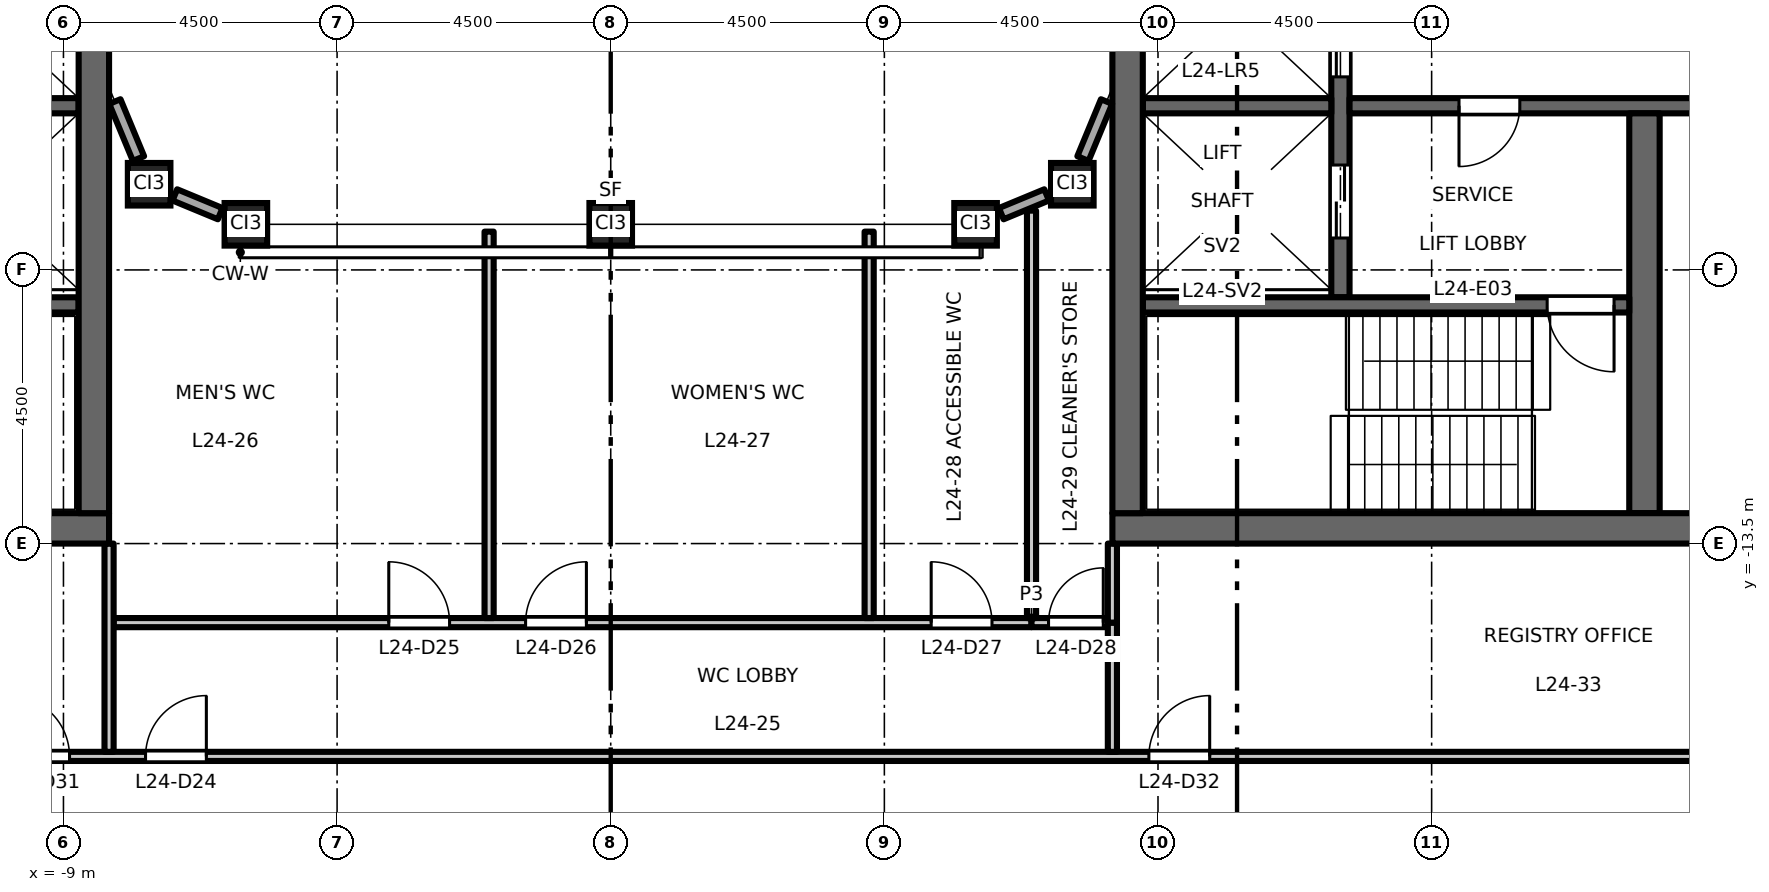
"""IFC4 building model, lengths in metres.
Left out: names, types, materials, properties, quantities, classifications, styles, units other than length and angle.
Written with IfcOpenShell. Run it as: python <this file> out.ifc"""

import sys

from ifc_helpers import new_model, si_unit, direction, frame, frame_2d, origin, origin_2d, place, context, subcontext, project, spatial, rectangle, hollow_rectangle, extrude, element, fill, save


model = new_model("IFC4")
c1 = context("Model", 3, precision=1e-05, world=origin(), true_north=direction((0.0, 1.0)))
c2 = subcontext(c1, "Body", "Model", "MODEL_VIEW")
j1 = project(units=[si_unit("LENGTHUNIT", "METRE"), si_unit("PLANEANGLEUNIT", "RADIAN")], contexts=[c1])
p1 = place(None, origin())
s1 = spatial("IfcSite", under=j1, at=p1, CompositionType="ELEMENT")
p2 = place(p1, origin())
s2 = spatial("IfcBuilding", under=s1, at=p2, CompositionType="ELEMENT")
p3 = place(p2, frame((0.0, 0.0, 113.7)))
s3 = spatial("IfcBuildingStorey", under=s2, at=p3, CompositionType="ELEMENT", Elevation=113.7)
for number, where, z_axis, x_axis in (
    (1, (-7.591, -7.591, 0.0), (0.0, 0.0, 1.0), (1.0, 0.0, 0.0)),
    (2, (-6.0, -8.25, 0.0), (0.0, 0.0, 1.0), (1.0, 0.0, 0.0)),
    (3, (0.0, -8.25, 0.0), (0.0, 0.0, 1.0), (1.0, 0.0, 0.0)),
    (4, (6.0, -8.25, 0.0), (0.0, 0.0, 1.0), (1.0, 0.0, 0.0)),
    (5, (7.591, -7.591, 0.0), (0.0, 0.0, 1.0), (1.0, 0.0, 0.0)),
):
    element("IfcColumn", number, at=place(p3, frame(where, z_axis=z_axis, x_axis=x_axis)), inside=s3, PredefinedType="COLUMN", context=c2, shape_type="SweptSolid", body=[
        extrude(hollow_rectangle(XDim=0.7, YDim=0.7, WallThickness=0.04, at=origin_2d()), origin(), (0.0, 0.0, 1.0), 4.5),
    ])
p4 = place(p3, frame((-8.75, -6.3, 0.0), z_axis=(0.0, 0.0, 1.0), x_axis=(-1.0, 0.0, 0.0)))
e6 = element("IfcWall", 6, at=p4, inside=s3, PredefinedType="SHEAR", context=c2, shape_type="SweptSolid", body=[
    extrude(rectangle(XDim=3.1, YDim=0.25, at=frame_2d((1.55, 0.0))), origin(), (0.0, 0.0, 1.0), 4.35),
])
p5 = place(p3, frame((-8.75, -9.575, 0.0), z_axis=(0.0, 0.0, 1.0), x_axis=(-1.0, 0.0, 0.0)))
e7 = element("IfcWall", 7, at=p5, inside=s3, PredefinedType="SHEAR", context=c2, shape_type="SweptSolid", body=[
    extrude(rectangle(XDim=8.0, YDim=0.25, at=frame_2d((4.0, 0.0))), origin(), (0.0, 0.0, 1.0), 4.35),
])
p6 = place(p5, frame((6.65, 0.0, 0.0)))
e8 = element("IfcOpeningElement", 8, at=p6, cuts=e7, PredefinedType="OPENING", context=c2, shape_type="SweptSolid", body=[
    extrude(rectangle(XDim=1.1, YDim=2.1, at=frame_2d((0.55, 1.05))), frame((0.0, 0.135, 0.0), z_axis=(0.0, -1.0, 0.0), x_axis=(1.0, 0.0, 0.0)), (0.0, 0.0, 1.0), 0.27),
])
p7 = place(p3, frame((-8.25, -13.25, 0.0), z_axis=(0.0, 0.0, 1.0), x_axis=(-1.0, 0.0, 0.0)))
e9 = element("IfcWall", 9, at=p7, inside=s3, PredefinedType="SHEAR", context=c2, shape_type="SweptSolid", body=[
    extrude(rectangle(XDim=13.5, YDim=0.5, at=frame_2d((6.75, 0.0))), origin(), (0.0, 0.0, 1.0), 4.35),
])
p8 = place(p3, frame((-8.5, -13.0, 0.0), z_axis=(0.0, 0.0, 1.0), x_axis=(0.0, 1.0, 0.0)))
e10 = element("IfcWall", 10, at=p8, inside=s3, PredefinedType="SHEAR", context=c2, shape_type="SweptSolid", body=[
    extrude(rectangle(XDim=26.0, YDim=0.5, at=frame_2d((13.0, 0.0))), origin(), (0.0, 0.0, 1.0), 4.35),
])
p9 = place(p3, frame((12.0, -9.45, 0.0), z_axis=(0.0, 0.0, 1.0), x_axis=(0.0, 1.0, 0.0)))
e11 = element("IfcWall", 11, at=p9, inside=s3, PredefinedType="SHEAR", context=c2, shape_type="SweptSolid", body=[
    extrude(rectangle(XDim=18.9, YDim=0.3, at=frame_2d((9.45, 0.0))), origin(), (0.0, 0.0, 1.0), 4.35),
])
p10 = place(p9, frame((3.625, 0.0, 0.0)))
e12 = element("IfcOpeningElement", 12, at=p10, cuts=e11, PredefinedType="OPENING", context=c2, shape_type="SweptSolid", body=[
    extrude(rectangle(XDim=1.1, YDim=2.1, at=frame_2d((0.55, 1.05))), frame((0.0, 0.16, 0.0), z_axis=(0.0, -1.0, 0.0), x_axis=(1.0, 0.0, 0.0)), (0.0, 0.0, 1.0), 0.32),
])
p11 = place(p9, frame((6.775, 0.0, 0.0)))
e13 = element("IfcOpeningElement", 13, at=p11, cuts=e11, PredefinedType="OPENING", context=c2, shape_type="SweptSolid", body=[
    extrude(rectangle(XDim=1.1, YDim=2.1, at=frame_2d((0.55, 1.05))), frame((0.0, 0.16, 0.0), z_axis=(0.0, -1.0, 0.0), x_axis=(1.0, 0.0, 0.0)), (0.0, 0.0, 1.0), 0.32),
])
p12 = place(p9, frame((9.925, 0.0, 0.0)))
e14 = element("IfcOpeningElement", 14, at=p12, cuts=e11, PredefinedType="OPENING", context=c2, shape_type="SweptSolid", body=[
    extrude(rectangle(XDim=1.1, YDim=2.1, at=frame_2d((0.55, 1.05))), frame((0.0, 0.16, 0.0), z_axis=(0.0, -1.0, 0.0), x_axis=(1.0, 0.0, 0.0)), (0.0, 0.0, 1.0), 0.32),
])
p13 = place(p9, frame((13.075, 0.0, 0.0)))
e15 = element("IfcOpeningElement", 15, at=p13, cuts=e11, PredefinedType="OPENING", context=c2, shape_type="SweptSolid", body=[
    extrude(rectangle(XDim=1.1, YDim=2.1, at=frame_2d((0.55, 1.05))), frame((0.0, 0.16, 0.0), z_axis=(0.0, -1.0, 0.0), x_axis=(1.0, 0.0, 0.0)), (0.0, 0.0, 1.0), 0.32),
])
p14 = place(p9, frame((16.725, 0.0, 0.0)))
e16 = element("IfcOpeningElement", 16, at=p14, cuts=e11, PredefinedType="OPENING", context=c2, shape_type="SweptSolid", body=[
    extrude(rectangle(XDim=1.2, YDim=2.1, at=frame_2d((0.6, 1.05))), frame((0.0, 0.16, 0.0), z_axis=(0.0, -1.0, 0.0), x_axis=(1.0, 0.0, 0.0)), (0.0, 0.0, 1.0), 0.32),
])
p15 = place(p9, frame((0.975, 0.0, 0.0)))
e17 = element("IfcOpeningElement", 17, at=p15, cuts=e11, PredefinedType="OPENING", context=c2, shape_type="SweptSolid", body=[
    extrude(rectangle(XDim=1.2, YDim=2.1, at=frame_2d((0.6, 1.05))), frame((0.0, 0.16, 0.0), z_axis=(0.0, -1.0, 0.0), x_axis=(1.0, 0.0, 0.0)), (0.0, 0.0, 1.0), 0.32),
])
p16 = place(p3, frame((12.15, -6.3, 0.0), z_axis=(0.0, 0.0, 1.0), x_axis=(1.0, 0.0, 0.0)))
e18 = element("IfcWall", 18, at=p16, inside=s3, PredefinedType="SHEAR", context=c2, shape_type="SweptSolid", body=[
    extrude(rectangle(XDim=9.1, YDim=0.25, at=frame_2d((4.55, 0.0))), origin(), (0.0, 0.0, 1.0), 4.35),
])
p17 = place(p16, frame((1.8, 0.0, 0.0)))
e19 = element("IfcOpeningElement", 19, at=p17, cuts=e18, PredefinedType="OPENING", context=c2, shape_type="SweptSolid", body=[
    extrude(rectangle(XDim=1.0, YDim=2.1, at=frame_2d((0.5, 1.05))), frame((0.0, 0.135, 0.0), z_axis=(0.0, -1.0, 0.0), x_axis=(1.0, 0.0, 0.0)), (0.0, 0.0, 1.0), 0.27),
])
p18 = place(p16, frame((6.65, 0.0, 0.0)))
e20 = element("IfcOpeningElement", 20, at=p18, cuts=e18, PredefinedType="OPENING", context=c2, shape_type="SweptSolid", body=[
    extrude(rectangle(XDim=0.9, YDim=2.1, at=frame_2d((0.45, 1.05))), frame((0.0, 0.135, 0.0), z_axis=(0.0, -1.0, 0.0), x_axis=(1.0, 0.0, 0.0)), (0.0, 0.0, 1.0), 0.27),
])
p19 = place(p3, frame((17.0, -13.0, 0.0), z_axis=(0.0, 0.0, 1.0), x_axis=(0.0, 1.0, 0.0)))
e21 = element("IfcWall", 21, at=p19, inside=s3, PredefinedType="SHEAR", context=c2, shape_type="SweptSolid", body=[
    extrude(rectangle(XDim=6.575, YDim=0.5, at=frame_2d((3.288, 0.0))), origin(), (0.0, 0.0, 1.0), 4.35),
])
p20 = place(p3, frame((8.75, -6.3, 0.0), z_axis=(0.0, 0.0, 1.0), x_axis=(1.0, 0.0, 0.0)))
e22 = element("IfcWall", 22, at=p20, inside=s3, PredefinedType="SHEAR", context=c2, shape_type="SweptSolid", body=[
    extrude(rectangle(XDim=3.1, YDim=0.25, at=frame_2d((1.55, 0.0))), origin(), (0.0, 0.0, 1.0), 4.35),
])
p21 = place(p3, frame((8.75, -9.575, 0.0), z_axis=(0.0, 0.0, 1.0), x_axis=(1.0, 0.0, 0.0)))
e23 = element("IfcWall", 23, at=p21, inside=s3, PredefinedType="SHEAR", context=c2, shape_type="SweptSolid", body=[
    extrude(rectangle(XDim=8.0, YDim=0.25, at=frame_2d((4.0, 0.0))), origin(), (0.0, 0.0, 1.0), 4.35),
])
p22 = place(p21, frame((6.65, 0.0, 0.0)))
e24 = element("IfcOpeningElement", 24, at=p22, cuts=e23, PredefinedType="OPENING", context=c2, shape_type="SweptSolid", body=[
    extrude(rectangle(XDim=1.1, YDim=2.1, at=frame_2d((0.55, 1.05))), frame((0.0, 0.135, 0.0), z_axis=(0.0, -1.0, 0.0), x_axis=(1.0, 0.0, 0.0)), (0.0, 0.0, 1.0), 0.27),
])
p23 = place(p3, frame((8.25, -13.25, 0.0), z_axis=(0.0, 0.0, 1.0), x_axis=(1.0, 0.0, 0.0)))
e25 = element("IfcWall", 25, at=p23, inside=s3, PredefinedType="SHEAR", context=c2, shape_type="SweptSolid", body=[
    extrude(rectangle(XDim=13.5, YDim=0.5, at=frame_2d((6.75, 0.0))), origin(), (0.0, 0.0, 1.0), 4.35),
])
p24 = place(p3, frame((8.5, -13.0, 0.0), z_axis=(0.0, 0.0, 1.0), x_axis=(0.0, 1.0, 0.0)))
e26 = element("IfcWall", 26, at=p24, inside=s3, PredefinedType="SHEAR", context=c2, shape_type="SweptSolid", body=[
    extrude(rectangle(XDim=26.0, YDim=0.5, at=frame_2d((13.0, 0.0))), origin(), (0.0, 0.0, 1.0), 4.35),
])
p25 = place(p3, frame((6.423, -8.075, 0.0), z_axis=(0.0, 0.0, 1.0), x_axis=(0.923817771127, 0.382832503518, 0.0)))
e27 = element("IfcWall", 27, at=p25, inside=s3, PredefinedType="STANDARD", context=c2, shape_type="SweptSolid", body=[
    extrude(rectangle(XDim=0.807, YDim=0.2, at=frame_2d((0.404, 0.0))), origin(), (0.0, 0.0, 1.0), 3.826),
])
for number, where, z_axis, x_axis in (
    (28, (7.766, -7.168, 0.0), (0.0, 0.0, 1.0), (0.383, 0.924, 0.0)),
    (29, (-8.154, -6.231, 0.0), (0.0, 0.0, 1.0), (0.383, -0.924, 0.0)),
):
    element("IfcWall", number, at=place(p3, frame(where, z_axis=z_axis, x_axis=x_axis)), inside=s3, PredefinedType="STANDARD", context=c2, shape_type="SweptSolid", body=[
        extrude(rectangle(XDim=1.015, YDim=0.2, at=frame_2d((0.507, 0.0))), origin(), (0.0, 0.0, 1.0), 3.826),
    ])
p26 = place(p3, frame((-7.168, -7.766, 0.0), z_axis=(0.0, 0.0, 1.0), x_axis=(0.923817771127, -0.382832503518, 0.0)))
e30 = element("IfcWall", 30, at=p26, inside=s3, PredefinedType="STANDARD", context=c2, shape_type="SweptSolid", body=[
    extrude(rectangle(XDim=0.807, YDim=0.2, at=frame_2d((0.404, 0.0))), origin(), (0.0, 0.0, 1.0), 3.826),
])
p27 = place(p3, frame((-21.825, -17.0, 0.0), z_axis=(0.0, 0.0, 1.0), x_axis=(1.0, 0.0, 0.0)))
e31 = element("IfcWall", 31, at=p27, inside=s3, PredefinedType="PARTITIONING", context=c2, shape_type="SweptSolid", body=[
    extrude(rectangle(XDim=43.65, YDim=0.15, at=frame_2d((21.825, 0.0))), origin(), (0.0, 0.0, 1.0), 4.35),
])
p28 = place(p27, frame((14.175, 0.0, 0.0)))
e32 = element("IfcOpeningElement", 32, at=p28, cuts=e31, PredefinedType="OPENING", context=c2, shape_type="SweptSolid", body=[
    extrude(rectangle(XDim=1.0, YDim=2.1, at=frame_2d((0.5, 1.05))), frame((0.0, 0.085, 0.0), z_axis=(0.0, -1.0, 0.0), x_axis=(1.0, 0.0, 0.0)), (0.0, 0.0, 1.0), 0.17),
])
p29 = place(p27, frame((11.925, 0.0, 0.0)))
e33 = element("IfcOpeningElement", 33, at=p29, cuts=e31, PredefinedType="OPENING", context=c2, shape_type="SweptSolid", body=[
    extrude(rectangle(XDim=1.0, YDim=2.1, at=frame_2d((0.5, 1.05))), frame((0.0, 0.085, 0.0), z_axis=(0.0, -1.0, 0.0), x_axis=(1.0, 0.0, 0.0)), (0.0, 0.0, 1.0), 0.17),
])
p30 = place(p27, frame((30.675, 0.0, 0.0)))
e34 = element("IfcOpeningElement", 34, at=p30, cuts=e31, PredefinedType="OPENING", context=c2, shape_type="SweptSolid", body=[
    extrude(rectangle(XDim=1.0, YDim=2.1, at=frame_2d((0.5, 1.05))), frame((0.0, 0.085, 0.0), z_axis=(0.0, -1.0, 0.0), x_axis=(1.0, 0.0, 0.0)), (0.0, 0.0, 1.0), 0.17),
])
p31 = place(p3, frame((-8.175, -14.8, 0.0), z_axis=(0.0, 0.0, 1.0), x_axis=(1.0, 0.0, 0.0)))
e35 = element("IfcWall", 35, at=p31, inside=s3, PredefinedType="PARTITIONING", context=c2, shape_type="SweptSolid", body=[
    extrude(rectangle(XDim=15.095, YDim=0.15, at=frame_2d((7.547, 0.0))), origin(), (0.0, 0.0, 1.0), 4.35),
])
p32 = place(p31, frame((4.525, 0.0, 0.0)))
e36 = element("IfcOpeningElement", 36, at=p32, cuts=e35, PredefinedType="OPENING", context=c2, shape_type="SweptSolid", body=[
    extrude(rectangle(XDim=1.0, YDim=2.1, at=frame_2d((0.5, 1.05))), frame((0.0, 0.085, 0.0), z_axis=(0.0, -1.0, 0.0), x_axis=(1.0, 0.0, 0.0)), (0.0, 0.0, 1.0), 0.17),
])
p33 = place(p31, frame((6.775, 0.0, 0.0)))
e37 = element("IfcOpeningElement", 37, at=p33, cuts=e35, PredefinedType="OPENING", context=c2, shape_type="SweptSolid", body=[
    extrude(rectangle(XDim=1.0, YDim=2.1, at=frame_2d((0.5, 1.05))), frame((0.0, 0.085, 0.0), z_axis=(0.0, -1.0, 0.0), x_axis=(1.0, 0.0, 0.0)), (0.0, 0.0, 1.0), 0.17),
])
p34 = place(p31, frame((13.445, 0.0, 0.0)))
e38 = element("IfcOpeningElement", 38, at=p34, cuts=e35, PredefinedType="OPENING", context=c2, shape_type="SweptSolid", body=[
    extrude(rectangle(XDim=1.0, YDim=2.1, at=frame_2d((0.5, 1.05))), frame((0.0, 0.085, 0.0), z_axis=(0.0, -1.0, 0.0), x_axis=(1.0, 0.0, 0.0)), (0.0, 0.0, 1.0), 0.17),
])
p35 = place(p3, frame((6.92, -14.8, 0.0), z_axis=(0.0, 0.0, 1.0), x_axis=(1.0, 0.0, 0.0)))
e39 = element("IfcWall", 39, at=p35, inside=s3, PredefinedType="PARTITIONING", context=c2, shape_type="SweptSolid", body=[
    extrude(rectangle(XDim=1.255, YDim=0.15, at=frame_2d((0.627, 0.0))), origin(), (0.0, 0.0, 1.0), 4.35),
])
p36 = place(p35, frame((0.28, 0.0, 0.0)))
e40 = element("IfcOpeningElement", 40, at=p36, cuts=e39, PredefinedType="OPENING", context=c2, shape_type="SweptSolid", body=[
    extrude(rectangle(XDim=0.9, YDim=2.1, at=frame_2d((0.45, 1.05))), frame((0.0, 0.085, 0.0), z_axis=(0.0, -1.0, 0.0), x_axis=(1.0, 0.0, 0.0)), (0.0, 0.0, 1.0), 0.17),
])
p37 = place(p3, frame((-8.25, -16.925, 0.0), z_axis=(0.0, 0.0, 1.0), x_axis=(0.0, 1.0, 0.0)))
e41 = element("IfcWall", 41, at=p37, inside=s3, PredefinedType="PARTITIONING", context=c2, shape_type="SweptSolid", body=[
    extrude(rectangle(XDim=3.425, YDim=0.15, at=frame_2d((1.712, 0.0))), origin(), (0.0, 0.0, 1.0), 4.35),
])
for number, where, z_axis, x_axis in (
    (42, (-2.0, -14.725, 0.0), (0.0, 0.0, 1.0), (0.0, 1.0, 0.0)),
    (43, (4.25, -14.725, 0.0), (0.0, 0.0, 1.0), (0.0, 1.0, 0.0)),
):
    element("IfcWall", number, at=place(p3, frame(where, z_axis=z_axis, x_axis=x_axis)), inside=s3, PredefinedType="PARTITIONING", context=c2, shape_type="SweptSolid", body=[
        extrude(rectangle(XDim=6.355, YDim=0.15, at=frame_2d((3.177, 0.0))), origin(), (0.0, 0.0, 1.0), 4.35),
    ])
p38 = place(p3, frame((6.92, -14.725, 0.0), z_axis=(0.0, 0.0, 1.0), x_axis=(0.0, 1.0, 0.0)))
e44 = element("IfcWall", 44, at=p38, inside=s3, PredefinedType="PARTITIONING", context=c2, shape_type="SweptSolid", body=[
    extrude(rectangle(XDim=6.7, YDim=0.15, at=frame_2d((3.35, 0.0))), origin(), (0.0, 0.0, 1.0), 4.35),
])
p39 = place(p3, frame((8.25, -16.925, 0.0), z_axis=(0.0, 0.0, 1.0), x_axis=(0.0, 1.0, 0.0)))
e45 = element("IfcWall", 45, at=p39, inside=s3, PredefinedType="PARTITIONING", context=c2, shape_type="SweptSolid", body=[
    extrude(rectangle(XDim=2.125, YDim=0.15, at=frame_2d((1.062, 0.0))), origin(), (0.0, 0.0, 1.0), 4.35),
])
p40 = place(p3, frame((8.25, -14.8, 0.0), z_axis=(0.0, 0.0, 1.0), x_axis=(0.0, 1.0, 0.0)))
e46 = element("IfcWall", 46, at=p40, inside=s3, PredefinedType="PARTITIONING", context=c2, shape_type="SweptSolid", body=[
    extrude(rectangle(XDim=1.3, YDim=0.15, at=frame_2d((0.65, 0.0))), origin(), (0.0, 0.0, 1.0), 4.35),
])
p41 = place(p17, origin())
e47 = element("IfcDoor", 47, at=p41, inside=s3, OperationType="SINGLE_SWING_LEFT", PredefinedType="DOOR", context=c2, shape_type="SweptSolid", body=[
    extrude(rectangle(XDim=1.0, YDim=2.1, at=frame_2d((0.5, 1.05))), frame((0.0, 0.025, 0.0), z_axis=(0.0, -1.0, 0.0), x_axis=(1.0, 0.0, 0.0)), (0.0, 0.0, 1.0), 0.05),
])
fill(e19, e47)
p42 = place(p22, origin())
e48 = element("IfcDoor", 48, at=p42, inside=s3, OperationType="SINGLE_SWING_RIGHT", PredefinedType="DOOR", context=c2, shape_type="SweptSolid", body=[
    extrude(rectangle(XDim=1.1, YDim=2.1, at=frame_2d((0.55, 1.05))), frame((0.0, 0.025, 0.0), z_axis=(0.0, -1.0, 0.0), x_axis=(1.0, 0.0, 0.0)), (0.0, 0.0, 1.0), 0.05),
])
fill(e24, e48)
p43 = place(p10, origin())
e49 = element("IfcDoor", 49, at=p43, inside=s3, OperationType="DOUBLE_DOOR_SLIDING", PredefinedType="DOOR", context=c2, shape_type="SweptSolid", body=[
    extrude(rectangle(XDim=1.1, YDim=2.1, at=frame_2d((0.55, 1.05))), frame((0.0, 0.025, 0.0), z_axis=(0.0, -1.0, 0.0), x_axis=(1.0, 0.0, 0.0)), (0.0, 0.0, 1.0), 0.05),
])
fill(e12, e49)
p44 = place(p15, origin())
e50 = element("IfcDoor", 50, at=p44, inside=s3, OperationType="DOUBLE_DOOR_SLIDING", PredefinedType="DOOR", context=c2, shape_type="SweptSolid", body=[
    extrude(rectangle(XDim=1.2, YDim=2.1, at=frame_2d((0.6, 1.05))), frame((0.0, 0.025, 0.0), z_axis=(0.0, -1.0, 0.0), x_axis=(1.0, 0.0, 0.0)), (0.0, 0.0, 1.0), 0.05),
])
fill(e17, e50)
p45 = place(p28, origin())
e51 = element("IfcDoor", 51, at=p45, inside=s3, OperationType="SINGLE_SWING_RIGHT", PredefinedType="DOOR", context=c2, shape_type="SweptSolid", body=[
    extrude(rectangle(XDim=1.0, YDim=2.1, at=frame_2d((0.5, 1.05))), frame((0.0, 0.025, 0.0), z_axis=(0.0, -1.0, 0.0), x_axis=(1.0, 0.0, 0.0)), (0.0, 0.0, 1.0), 0.05),
])
fill(e32, e51)
p46 = place(p32, origin())
e52 = element("IfcDoor", 52, at=p46, inside=s3, OperationType="SINGLE_SWING_LEFT", PredefinedType="DOOR", context=c2, shape_type="SweptSolid", body=[
    extrude(rectangle(XDim=1.0, YDim=2.1, at=frame_2d((0.5, 1.05))), frame((0.0, 0.025, 0.0), z_axis=(0.0, -1.0, 0.0), x_axis=(1.0, 0.0, 0.0)), (0.0, 0.0, 1.0), 0.05),
])
fill(e36, e52)
p47 = place(p33, origin())
e53 = element("IfcDoor", 53, at=p47, inside=s3, OperationType="SINGLE_SWING_RIGHT", PredefinedType="DOOR", context=c2, shape_type="SweptSolid", body=[
    extrude(rectangle(XDim=1.0, YDim=2.1, at=frame_2d((0.5, 1.05))), frame((0.0, 0.025, 0.0), z_axis=(0.0, -1.0, 0.0), x_axis=(1.0, 0.0, 0.0)), (0.0, 0.0, 1.0), 0.05),
])
fill(e37, e53)
p48 = place(p34, origin())
e54 = element("IfcDoor", 54, at=p48, inside=s3, OperationType="SINGLE_SWING_LEFT", PredefinedType="DOOR", context=c2, shape_type="SweptSolid", body=[
    extrude(rectangle(XDim=1.0, YDim=2.1, at=frame_2d((0.5, 1.05))), frame((0.0, 0.025, 0.0), z_axis=(0.0, -1.0, 0.0), x_axis=(1.0, 0.0, 0.0)), (0.0, 0.0, 1.0), 0.05),
])
fill(e38, e54)
p49 = place(p36, origin())
e55 = element("IfcDoor", 55, at=p49, inside=s3, OperationType="SINGLE_SWING_RIGHT", PredefinedType="DOOR", context=c2, shape_type="SweptSolid", body=[
    extrude(rectangle(XDim=0.9, YDim=2.1, at=frame_2d((0.45, 1.05))), frame((0.0, 0.025, 0.0), z_axis=(0.0, -1.0, 0.0), x_axis=(1.0, 0.0, 0.0)), (0.0, 0.0, 1.0), 0.05),
])
fill(e40, e55)
p50 = place(p29, origin())
e56 = element("IfcDoor", 56, at=p50, inside=s3, OperationType="SINGLE_SWING_LEFT", PredefinedType="DOOR", context=c2, shape_type="SweptSolid", body=[
    extrude(rectangle(XDim=1.0, YDim=2.1, at=frame_2d((0.5, 1.05))), frame((0.0, 0.025, 0.0), z_axis=(0.0, -1.0, 0.0), x_axis=(1.0, 0.0, 0.0)), (0.0, 0.0, 1.0), 0.05),
])
fill(e33, e56)
p51 = place(p30, origin())
e57 = element("IfcDoor", 57, at=p51, inside=s3, OperationType="SINGLE_SWING_RIGHT", PredefinedType="DOOR", context=c2, shape_type="SweptSolid", body=[
    extrude(rectangle(XDim=1.0, YDim=2.1, at=frame_2d((0.5, 1.05))), frame((0.0, 0.025, 0.0), z_axis=(0.0, -1.0, 0.0), x_axis=(1.0, 0.0, 0.0)), (0.0, 0.0, 1.0), 0.05),
])
fill(e34, e57)
save(model, sys.argv[1])
